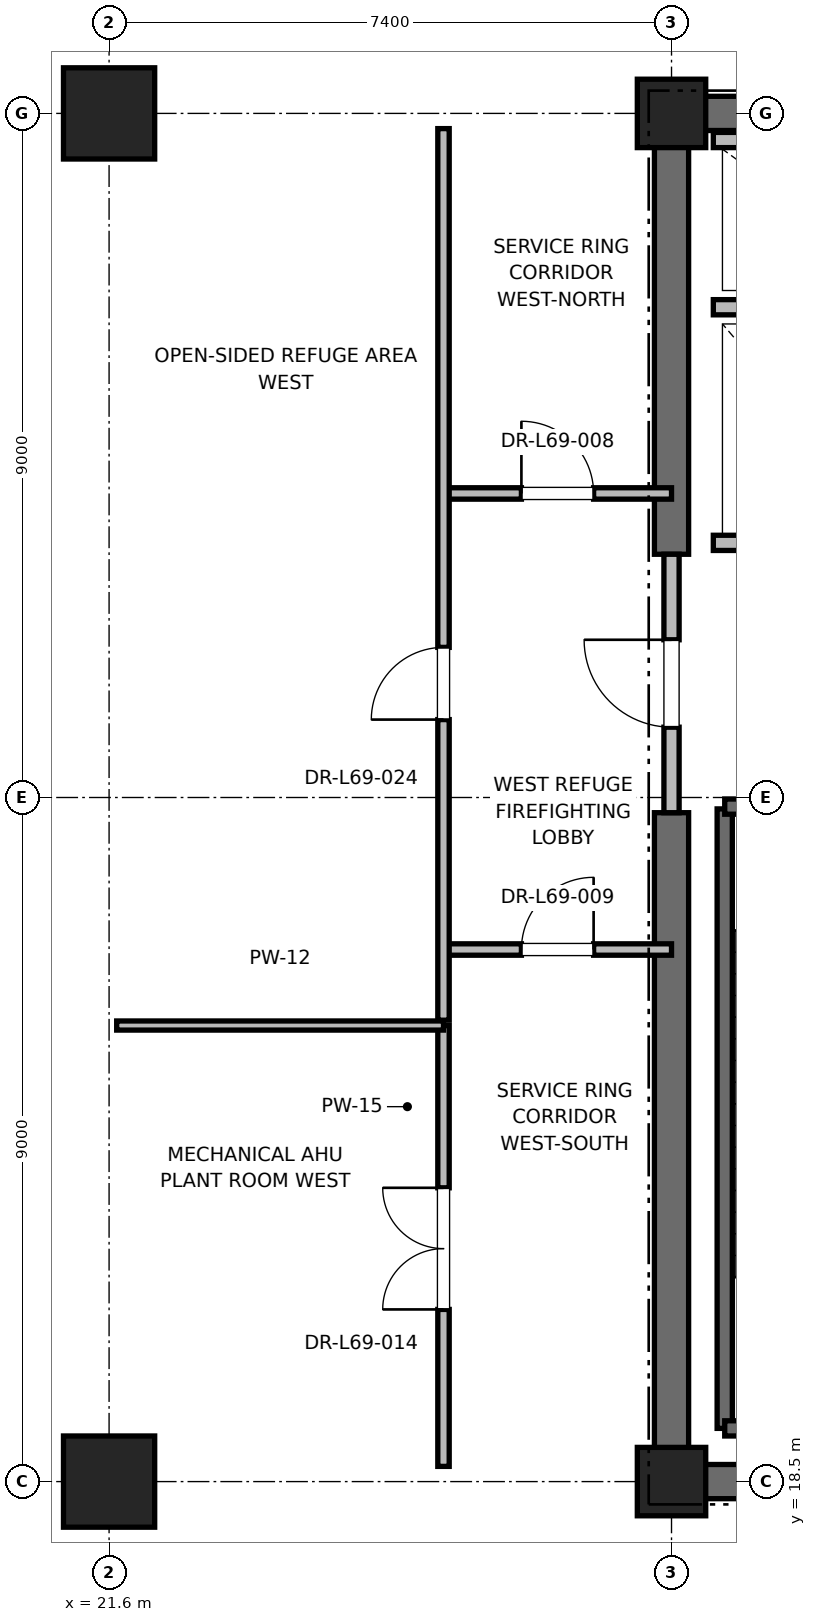
"""IFC4 building model, lengths in metres.
Left out: names, types, materials, properties, quantities, classifications, styles, units other than length and angle.
Written with IfcOpenShell. Run it as: python <this file> out.ifc"""

import sys

from ifc_helpers import new_model, si_unit, direction, frame, frame_2d, origin, origin_2d, place, context, subcontext, project, spatial, rectangle, extrude, element, fill, save


model = new_model("IFC4")
c1 = context("Model", 3, precision=1e-05, world=origin(), true_north=direction((0.0, 1.0)))
c2 = subcontext(c1, "Body", "Model", "MODEL_VIEW")
j1 = project(units=[si_unit("LENGTHUNIT", "METRE"), si_unit("PLANEANGLEUNIT", "RADIAN")], contexts=[c1])
p1 = place(None, origin())
s1 = spatial("IfcSite", under=j1, at=p1, CompositionType="ELEMENT")
p2 = place(p1, origin())
s2 = spatial("IfcBuilding", under=s1, at=p2, CompositionType="ELEMENT")
p3 = place(p2, frame((0.0, 0.0, 295.2)))
s3 = spatial("IfcBuildingStorey", under=s2, at=p3, CompositionType="ELEMENT", Elevation=295.2)
for number, where, z_axis, x_axis in (
    (1, (21.6, 18.5, 0.0), (0.0, 0.0, 1.0), (1.0, 0.0, 0.0)),
    (2, (21.6, 36.5, 0.0), (0.0, 0.0, 1.0), (1.0, 0.0, 0.0)),
):
    element("IfcColumn", number, at=place(p3, frame(where, z_axis=z_axis, x_axis=x_axis)), inside=s3, PredefinedType="COLUMN", context=c2, shape_type="SweptSolid", body=[
        extrude(rectangle(XDim=1.2, YDim=1.2, at=origin_2d()), origin(), (0.0, 0.0, 1.0), 5.8),
    ])
for number, where, z_axis, x_axis in (
    (3, (29.0, 18.5, 0.0), (0.0, 0.0, 1.0), (1.0, 0.0, 0.0)),
    (4, (29.0, 36.5, 0.0), (0.0, 0.0, 1.0), (1.0, 0.0, 0.0)),
):
    element("IfcColumn", number, at=place(p3, frame(where, z_axis=z_axis, x_axis=x_axis)), inside=s3, PredefinedType="PILASTER", context=c2, shape_type="SweptSolid", body=[
        extrude(rectangle(XDim=0.9, YDim=0.9, at=origin_2d()), origin(), (0.0, 0.0, 1.0), 5.8),
    ])
p4 = place(p3, frame((29.0, 18.5, 0.0), z_axis=(0.0, 0.0, 1.0), x_axis=(1.0, 0.0, 0.0)))
e5 = element("IfcWall", 5, at=p4, inside=s3, PredefinedType="SHEAR", context=c2, shape_type="SweptSolid", body=[
    extrude(rectangle(XDim=9.2, YDim=0.45, at=frame_2d((4.6, 0.0))), origin(), (0.0, 0.0, 1.0), 5.5),
])
p5 = place(p3, frame((29.0, 36.5, 0.0), z_axis=(0.0, 0.0, 1.0), x_axis=(1.0, 0.0, 0.0)))
e6 = element("IfcWall", 6, at=p5, inside=s3, PredefinedType="SHEAR", context=c2, shape_type="SweptSolid", body=[
    extrude(rectangle(XDim=5.8, YDim=0.45, at=frame_2d((2.9, 0.0))), origin(), (0.0, 0.0, 1.0), 5.5),
])
p6 = place(p3, frame((29.0, 18.5, 0.0), z_axis=(0.0, 0.0, 1.0), x_axis=(0.0, 1.0, 0.0)))
e7 = element("IfcWall", 7, at=p6, inside=s3, PredefinedType="SHEAR", context=c2, shape_type="SweptSolid", body=[
    extrude(rectangle(XDim=8.8, YDim=0.45, at=frame_2d((4.4, 0.0))), origin(), (0.0, 0.0, 1.0), 5.5),
])
p7 = place(p3, frame((29.0, 30.7, 0.0), z_axis=(0.0, 0.0, 1.0), x_axis=(0.0, 1.0, 0.0)))
e8 = element("IfcWall", 8, at=p7, inside=s3, PredefinedType="SHEAR", context=c2, shape_type="SweptSolid", body=[
    extrude(rectangle(XDim=5.8, YDim=0.45, at=frame_2d((2.9, 0.0))), origin(), (0.0, 0.0, 1.0), 5.5),
])
p8 = place(p3, frame((29.7, 19.2, 0.0), z_axis=(0.0, 0.0, 1.0), x_axis=(0.0, 1.0, 0.0)))
e9 = element("IfcWall", 9, at=p8, inside=s3, PredefinedType="SOLIDWALL", context=c2, shape_type="SweptSolid", body=[
    extrude(rectangle(XDim=8.15, YDim=0.2, at=frame_2d((4.075, 0.0))), origin(), (0.0, 0.0, 1.0), 5.5),
])
p9 = place(p3, frame((29.7, 19.2, 0.0), z_axis=(0.0, 0.0, 1.0), x_axis=(1.0, 0.0, 0.0)))
e10 = element("IfcWall", 10, at=p9, inside=s3, PredefinedType="SOLIDWALL", context=c2, shape_type="SweptSolid", body=[
    extrude(rectangle(XDim=3.12, YDim=0.2, at=frame_2d((1.56, 0.0))), origin(), (0.0, 0.0, 1.0), 5.5),
])
p10 = place(p3, frame((29.7, 27.38, 0.0), z_axis=(0.0, 0.0, 1.0), x_axis=(1.0, 0.0, 0.0)))
e11 = element("IfcWall", 11, at=p10, inside=s3, PredefinedType="SOLIDWALL", context=c2, shape_type="SweptSolid", body=[
    extrude(rectangle(XDim=3.12, YDim=0.2, at=frame_2d((1.56, 0.0))), origin(), (0.0, 0.0, 1.0), 5.5),
])
p11 = place(p10, frame((1.01, 0.0, 0.0)))
e12 = element("IfcOpeningElement", 12, at=p11, cuts=e11, PredefinedType="OPENING", context=c2, shape_type="SweptSolid", body=[
    extrude(rectangle(XDim=1.1, YDim=2.15, at=frame_2d((0.55, 1.075))), frame((0.0, 0.1, 0.0), z_axis=(0.0, -1.0, 0.0), x_axis=(1.0, 0.0, 0.0)), (0.0, 0.0, 1.0), 0.2),
])
p12 = place(p3, frame((29.0, 27.3, 0.0), z_axis=(0.0, 0.0, 1.0), x_axis=(0.0, 1.0, 0.0)))
e13 = element("IfcWall", 13, at=p12, inside=s3, PredefinedType="PARTITIONING", context=c2, shape_type="SweptSolid", body=[
    extrude(rectangle(XDim=3.4, YDim=0.2, at=frame_2d((1.7, 0.0))), origin(), (0.0, 0.0, 1.0), 4.58),
])
p13 = place(p12, frame((1.125, 0.0, 0.0)))
e14 = element("IfcOpeningElement", 14, at=p13, cuts=e13, PredefinedType="OPENING", context=c2, shape_type="SweptSolid", body=[
    extrude(rectangle(XDim=1.15, YDim=2.2, at=frame_2d((0.575, 1.1))), frame((0.0, 0.1, 0.0), z_axis=(0.0, -1.0, 0.0), x_axis=(1.0, 0.0, 0.0)), (0.0, 0.0, 1.0), 0.2),
])
p14 = place(p3, frame((29.55, 30.85, 0.0), z_axis=(0.0, 0.0, 1.0), x_axis=(1.0, 0.0, 0.0)))
e15 = element("IfcWall", 15, at=p14, inside=s3, PredefinedType="SOLIDWALL", context=c2, shape_type="SweptSolid", body=[
    extrude(rectangle(XDim=2.6, YDim=0.2, at=frame_2d((1.3, 0.0))), origin(), (0.0, 0.0, 1.0), 4.58),
])
p15 = place(p14, frame((0.75, 0.0, 0.0)))
e16 = element("IfcOpeningElement", 16, at=p15, cuts=e15, PredefinedType="OPENING", context=c2, shape_type="SweptSolid", body=[
    extrude(rectangle(XDim=1.1, YDim=2.2, at=frame_2d((0.55, 1.1))), frame((0.0, 0.1, 0.0), z_axis=(0.0, -1.0, 0.0), x_axis=(1.0, 0.0, 0.0)), (0.0, 0.0, 1.0), 0.2),
])
p16 = place(p3, frame((29.55, 33.95, 0.0), z_axis=(0.0, 0.0, 1.0), x_axis=(1.0, 0.0, 0.0)))
e17 = element("IfcWall", 17, at=p16, inside=s3, PredefinedType="SOLIDWALL", context=c2, shape_type="SweptSolid", body=[
    extrude(rectangle(XDim=2.8, YDim=0.2, at=frame_2d((1.4, 0.0))), origin(), (0.0, 0.0, 1.0), 5.5),
])
p17 = place(p3, frame((32.35, 36.15, 0.0), z_axis=(0.0, 0.0, 1.0), x_axis=(-1.0, 0.0, 0.0)))
e18 = element("IfcWall", 18, at=p17, inside=s3, PredefinedType="SOLIDWALL", context=c2, shape_type="SweptSolid", body=[
    extrude(rectangle(XDim=2.8, YDim=0.2, at=frame_2d((1.4, 0.0))), origin(), (0.0, 0.0, 1.0), 4.553),
])
p18 = place(p3, frame((26.0, 25.5, 0.0), z_axis=(0.0, 0.0, 1.0), x_axis=(1.0, 0.0, 0.0)))
e19 = element("IfcWall", 19, at=p18, inside=s3, PredefinedType="PARTITIONING", context=c2, shape_type="SweptSolid", body=[
    extrude(rectangle(XDim=3.0, YDim=0.15, at=frame_2d((1.5, 0.0))), origin(), (0.0, 0.0, 1.0), 2.85),
])
p19 = place(p18, frame((1.025, 0.0, 0.0)))
e20 = element("IfcOpeningElement", 20, at=p19, cuts=e19, PredefinedType="OPENING", context=c2, shape_type="SweptSolid", body=[
    extrude(rectangle(XDim=0.95, YDim=2.15, at=frame_2d((0.475, 1.075))), frame((0.0, 0.075, 0.0), z_axis=(0.0, -1.0, 0.0), x_axis=(1.0, 0.0, 0.0)), (0.0, 0.0, 1.0), 0.15),
])
p20 = place(p3, frame((26.0, 31.5, 0.0), z_axis=(0.0, 0.0, 1.0), x_axis=(1.0, 0.0, 0.0)))
e21 = element("IfcWall", 21, at=p20, inside=s3, PredefinedType="PARTITIONING", context=c2, shape_type="SweptSolid", body=[
    extrude(rectangle(XDim=3.0, YDim=0.15, at=frame_2d((1.5, 0.0))), origin(), (0.0, 0.0, 1.0), 2.85),
])
p21 = place(p20, frame((1.025, 0.0, 0.0)))
e22 = element("IfcOpeningElement", 22, at=p21, cuts=e21, PredefinedType="OPENING", context=c2, shape_type="SweptSolid", body=[
    extrude(rectangle(XDim=0.95, YDim=2.15, at=frame_2d((0.475, 1.075))), frame((0.0, 0.075, 0.0), z_axis=(0.0, -1.0, 0.0), x_axis=(1.0, 0.0, 0.0)), (0.0, 0.0, 1.0), 0.15),
])
p22 = place(p3, frame((26.0, 18.7, 0.0), z_axis=(0.0, 0.0, 1.0), x_axis=(0.0, 1.0, 0.0)))
e23 = element("IfcWall", 23, at=p22, inside=s3, PredefinedType="PARTITIONING", context=c2, shape_type="SweptSolid", body=[
    extrude(rectangle(XDim=5.8, YDim=0.15, at=frame_2d((2.9, 0.0))), origin(), (0.0, 0.0, 1.0), 2.85),
])
p23 = place(p22, frame((2.065, 0.0, 0.0)))
e24 = element("IfcOpeningElement", 24, at=p23, cuts=e23, PredefinedType="OPENING", context=c2, shape_type="SweptSolid", body=[
    extrude(rectangle(XDim=1.6, YDim=2.25, at=frame_2d((0.8, 1.125))), frame((0.0, 0.075, 0.0), z_axis=(0.0, -1.0, 0.0), x_axis=(1.0, 0.0, 0.0)), (0.0, 0.0, 1.0), 0.15),
])
p24 = place(p3, frame((21.7, 24.5, 0.0), z_axis=(0.0, 0.0, 1.0), x_axis=(1.0, 0.0, 0.0)))
e25 = element("IfcWall", 25, at=p24, inside=s3, PredefinedType="PARTITIONING", context=c2, shape_type="SweptSolid", body=[
    extrude(rectangle(XDim=4.3, YDim=0.12, at=frame_2d((2.15, 0.0))), origin(), (0.0, 0.0, 1.0), 2.85),
])
p25 = place(p3, frame((26.0, 24.57, 0.0), z_axis=(0.0, 0.0, 1.0), x_axis=(0.0, 1.0, 0.0)))
e26 = element("IfcWall", 26, at=p25, inside=s3, PredefinedType="PARTITIONING", context=c2, shape_type="SweptSolid", body=[
    extrude(rectangle(XDim=11.73, YDim=0.15, at=frame_2d((5.865, 0.0))), origin(), (0.0, 0.0, 1.0), 2.85),
])
p26 = place(p25, frame((3.955, 0.0, 0.0)))
e27 = element("IfcOpeningElement", 27, at=p26, cuts=e26, PredefinedType="OPENING", context=c2, shape_type="SweptSolid", body=[
    extrude(rectangle(XDim=0.95, YDim=2.15, at=frame_2d((0.475, 1.075))), frame((0.0, 0.075, 0.0), z_axis=(0.0, -1.0, 0.0), x_axis=(1.0, 0.0, 0.0)), (0.0, 0.0, 1.0), 0.15),
])
p27 = place(p13, origin())
e28 = element("IfcDoor", 28, at=p27, inside=s3, OperationType="SINGLE_SWING_RIGHT", PredefinedType="DOOR", context=c2, shape_type="SweptSolid", body=[
    extrude(rectangle(XDim=1.15, YDim=2.2, at=frame_2d((0.575, 1.1))), frame((0.0, 0.025, 0.0), z_axis=(0.0, -1.0, 0.0), x_axis=(1.0, 0.0, 0.0)), (0.0, 0.0, 1.0), 0.05),
])
fill(e14, e28)
p28 = place(p19, origin())
e29 = element("IfcDoor", 29, at=p28, inside=s3, OperationType="SINGLE_SWING_RIGHT", PredefinedType="DOOR", context=c2, shape_type="SweptSolid", body=[
    extrude(rectangle(XDim=0.95, YDim=2.15, at=frame_2d((0.475, 1.075))), frame((0.0, 0.025, 0.0), z_axis=(0.0, -1.0, 0.0), x_axis=(1.0, 0.0, 0.0)), (0.0, 0.0, 1.0), 0.05),
])
fill(e20, e29)
p29 = place(p21, origin())
e30 = element("IfcDoor", 30, at=p29, inside=s3, OperationType="SINGLE_SWING_LEFT", PredefinedType="DOOR", context=c2, shape_type="SweptSolid", body=[
    extrude(rectangle(XDim=0.95, YDim=2.15, at=frame_2d((0.475, 1.075))), frame((0.0, 0.025, 0.0), z_axis=(0.0, -1.0, 0.0), x_axis=(1.0, 0.0, 0.0)), (0.0, 0.0, 1.0), 0.05),
])
fill(e22, e30)
p30 = place(p23, origin())
e31 = element("IfcDoor", 31, at=p30, inside=s3, OperationType="DOUBLE_DOOR_SINGLE_SWING", PredefinedType="DOOR", context=c2, shape_type="SweptSolid", body=[
    extrude(rectangle(XDim=1.6, YDim=2.25, at=frame_2d((0.8, 1.125))), frame((0.0, 0.025, 0.0), z_axis=(0.0, -1.0, 0.0), x_axis=(1.0, 0.0, 0.0)), (0.0, 0.0, 1.0), 0.05),
])
fill(e24, e31)
p31 = place(p26, origin())
e32 = element("IfcDoor", 32, at=p31, inside=s3, OperationType="SINGLE_SWING_LEFT", PredefinedType="DOOR", context=c2, shape_type="SweptSolid", body=[
    extrude(rectangle(XDim=0.95, YDim=2.15, at=frame_2d((0.475, 1.075))), frame((0.0, 0.025, 0.0), z_axis=(0.0, -1.0, 0.0), x_axis=(1.0, 0.0, 0.0)), (0.0, 0.0, 1.0), 0.05),
])
fill(e27, e32)
save(model, sys.argv[1])
